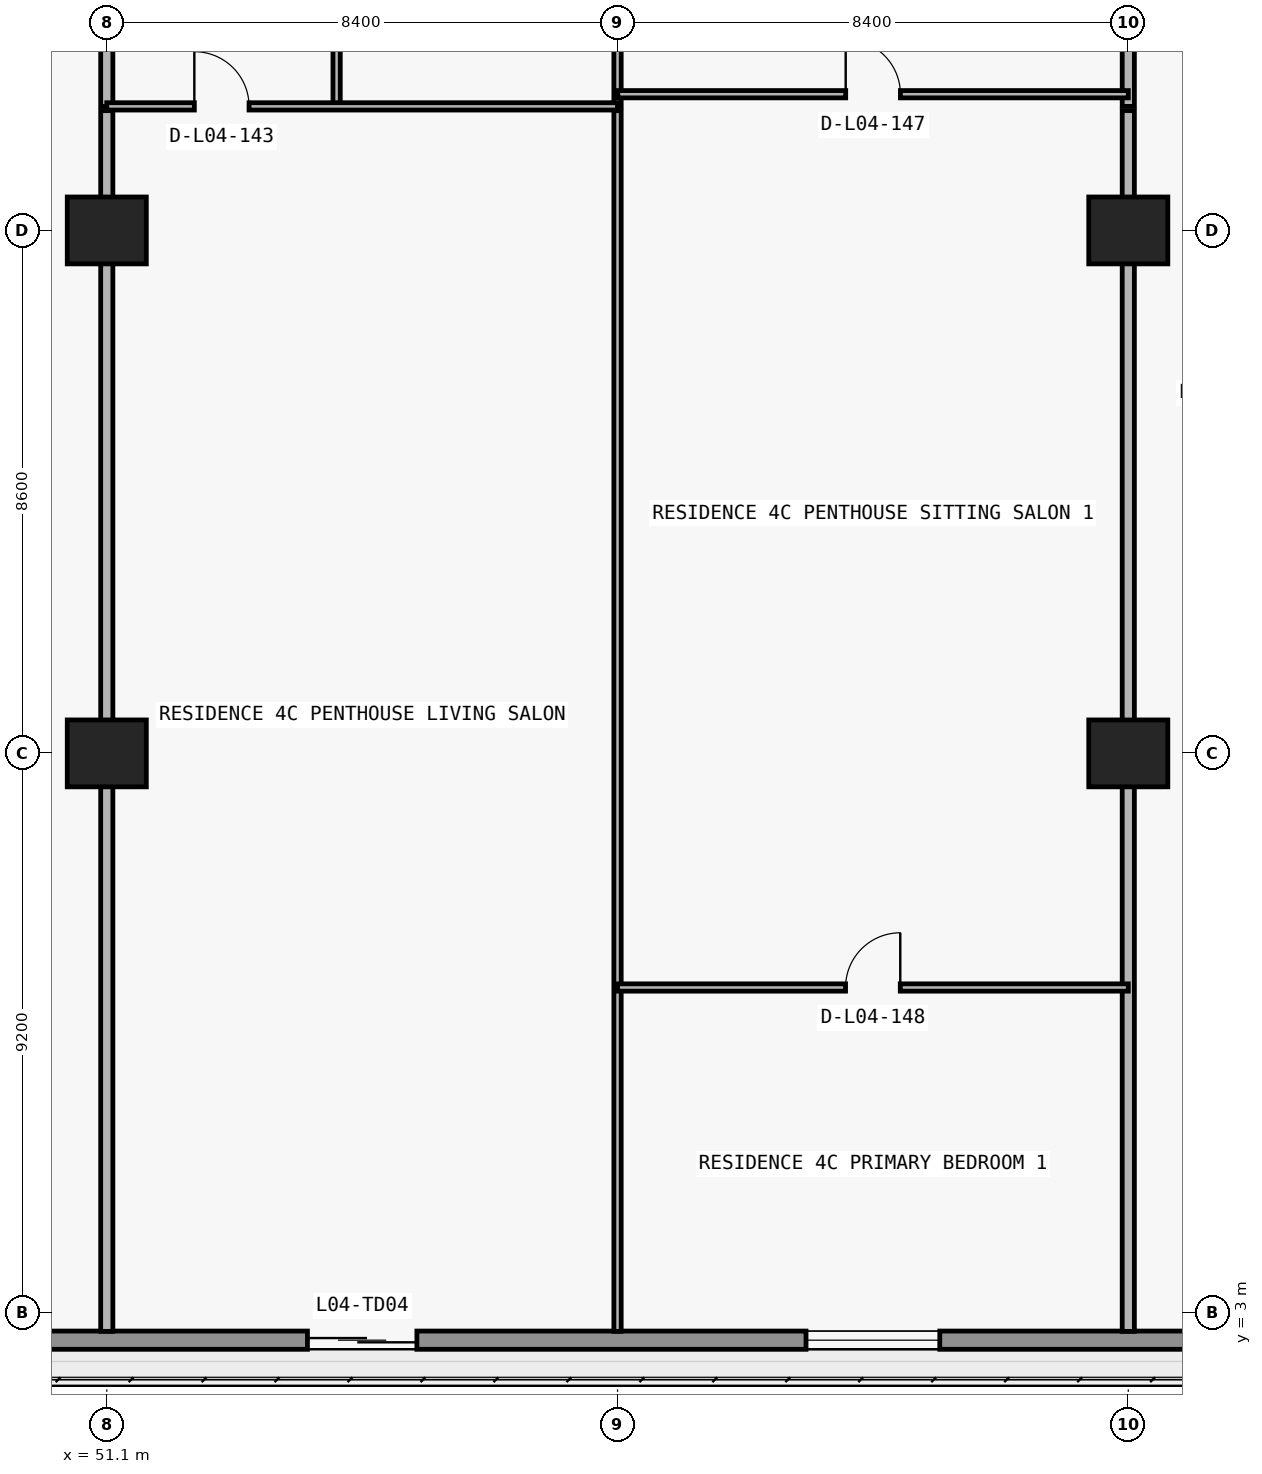
"""IFC4 building model, lengths in metres.
Left out: names, types, materials, properties, quantities, classifications, styles, units other than length and angle.
Written with IfcOpenShell. Run it as: python <this file> out.ifc"""

import sys

from ifc_helpers import new_model, si_unit, direction, frame, frame_2d, origin, origin_2d, place, context, subcontext, project, spatial, rectangle, extrude, element, fill, save


model = new_model("IFC4")
c1 = context("Model", 3, precision=1e-05, world=origin(), true_north=direction((0.0, 1.0)))
c2 = subcontext(c1, "Body", "Model", "MODEL_VIEW")
j1 = project(units=[si_unit("LENGTHUNIT", "METRE"), si_unit("PLANEANGLEUNIT", "RADIAN")], contexts=[c1])
p1 = place(None, origin())
s1 = spatial("IfcSite", under=j1, at=p1, CompositionType="ELEMENT")
p2 = place(p1, origin())
s2 = spatial("IfcBuilding", under=s1, at=p2, CompositionType="ELEMENT")
p3 = place(p2, frame((0.0, 0.0, 19.8)))
s3 = spatial("IfcBuildingStorey", under=s2, at=p3, CompositionType="ELEMENT", Elevation=19.8)
for number, where, z_axis, x_axis in (
    (1, (51.1, 12.2, 0.0), (0.0, 0.0, 1.0), (1.0, 0.0, 0.0)),
    (2, (67.9, 12.2, 0.0), (0.0, 0.0, 1.0), (1.0, 0.0, 0.0)),
    (3, (51.1, 20.8, 0.0), (0.0, 0.0, 1.0), (1.0, 0.0, 0.0)),
    (4, (67.9, 20.8, 0.0), (0.0, 0.0, 1.0), (1.0, 0.0, 0.0)),
):
    element("IfcColumn", number, at=place(p3, frame(where, z_axis=z_axis, x_axis=x_axis)), inside=s3, PredefinedType="COLUMN", context=c2, shape_type="SweptSolid", body=[
        extrude(rectangle(XDim=1.3, YDim=1.1, at=origin_2d()), origin(), (0.0, 0.0, 1.0), 4.45),
    ])
p4 = place(p3, frame((74.15, 2.55, 0.0), z_axis=(0.0, 0.0, 1.0), x_axis=(-1.0, 0.0, 0.0)))
e5 = element("IfcWall", 5, at=p4, inside=s3, PredefinedType="STANDARD", context=c2, shape_type="SweptSolid", body=[
    extrude(rectangle(XDim=70.5, YDim=0.3, at=frame_2d((35.25, 0.0))), origin(), (0.0, 0.0, 1.0), 4.45),
])
p5 = place(p4, frame((65.875, 0.0, 0.85)))
e6 = element("IfcOpeningElement", 6, at=p5, cuts=e5, PredefinedType="OPENING", context=c2, shape_type="SweptSolid", body=[
    extrude(rectangle(XDim=3.0, YDim=2.4, at=frame_2d((1.5, 1.2))), frame((0.0, 0.16, 0.0), z_axis=(0.0, -1.0, 0.0), x_axis=(1.0, 0.0, 0.0)), (0.0, 0.0, 1.0), 0.32),
])
p6 = place(p4, frame((61.376, 0.0, 0.0)))
e7 = element("IfcOpeningElement", 7, at=p6, cuts=e5, PredefinedType="OPENING", context=c2, shape_type="SweptSolid", body=[
    extrude(rectangle(XDim=1.8, YDim=2.3, at=frame_2d((0.9, 1.15))), frame((0.0, 0.16, 0.0), z_axis=(0.0, -1.0, 0.0), x_axis=(1.0, 0.0, 0.0)), (0.0, 0.0, 1.0), 0.32),
])
p7 = place(p4, frame((56.976, 0.0, 0.85)))
e8 = element("IfcOpeningElement", 8, at=p7, cuts=e5, PredefinedType="OPENING", context=c2, shape_type="SweptSolid", body=[
    extrude(rectangle(XDim=2.2, YDim=1.55, at=frame_2d((1.1, 0.775))), frame((0.0, 0.16, 0.0), z_axis=(0.0, -1.0, 0.0), x_axis=(1.0, 0.0, 0.0)), (0.0, 0.0, 1.0), 0.32),
])
p8 = place(p4, frame((52.64, 0.0, 0.0)))
e9 = element("IfcOpeningElement", 9, at=p8, cuts=e5, PredefinedType="OPENING", context=c2, shape_type="SweptSolid", body=[
    extrude(rectangle(XDim=1.8, YDim=2.3, at=frame_2d((0.9, 1.15))), frame((0.0, 0.16, 0.0), z_axis=(0.0, -1.0, 0.0), x_axis=(1.0, 0.0, 0.0)), (0.0, 0.0, 1.0), 0.32),
])
p9 = place(p4, frame((48.24, 0.0, 0.85)))
e10 = element("IfcOpeningElement", 10, at=p9, cuts=e5, PredefinedType="OPENING", context=c2, shape_type="SweptSolid", body=[
    extrude(rectangle(XDim=2.2, YDim=1.55, at=frame_2d((1.1, 0.775))), frame((0.0, 0.16, 0.0), z_axis=(0.0, -1.0, 0.0), x_axis=(1.0, 0.0, 0.0)), (0.0, 0.0, 1.0), 0.32),
])
p10 = place(p4, frame((34.35, 0.0, 0.0)))
e11 = element("IfcOpeningElement", 11, at=p10, cuts=e5, PredefinedType="OPENING", context=c2, shape_type="SweptSolid", body=[
    extrude(rectangle(XDim=1.8, YDim=2.3, at=frame_2d((0.9, 1.15))), frame((0.0, 0.16, 0.0), z_axis=(0.0, -1.0, 0.0), x_axis=(1.0, 0.0, 0.0)), (0.0, 0.0, 1.0), 0.32),
])
p11 = place(p4, frame((17.95, 0.0, 0.0)))
e12 = element("IfcOpeningElement", 12, at=p11, cuts=e5, PredefinedType="OPENING", context=c2, shape_type="SweptSolid", body=[
    extrude(rectangle(XDim=1.8, YDim=2.3, at=frame_2d((0.9, 1.15))), frame((0.0, 0.16, 0.0), z_axis=(0.0, -1.0, 0.0), x_axis=(1.0, 0.0, 0.0)), (0.0, 0.0, 1.0), 0.32),
])
p12 = place(p4, frame((9.35, 0.0, 0.85)))
e13 = element("IfcOpeningElement", 13, at=p12, cuts=e5, PredefinedType="OPENING", context=c2, shape_type="SweptSolid", body=[
    extrude(rectangle(XDim=2.2, YDim=1.55, at=frame_2d((1.1, 0.775))), frame((0.0, 0.16, 0.0), z_axis=(0.0, -1.0, 0.0), x_axis=(1.0, 0.0, 0.0)), (0.0, 0.0, 1.0), 0.32),
])
p13 = place(p4, frame((1.625, 0.0, 0.85)))
e14 = element("IfcOpeningElement", 14, at=p13, cuts=e5, PredefinedType="OPENING", context=c2, shape_type="SweptSolid", body=[
    extrude(rectangle(XDim=3.0, YDim=2.4, at=frame_2d((1.5, 1.2))), frame((0.0, 0.16, 0.0), z_axis=(0.0, -1.0, 0.0), x_axis=(1.0, 0.0, 0.0)), (0.0, 0.0, 1.0), 0.32),
])
p14 = place(p3, frame((51.1, 2.695, 0.0), z_axis=(0.0, 0.0, 1.0), x_axis=(0.0, 1.0, 0.0)))
e15 = element("IfcWall", 15, at=p14, inside=s3, PredefinedType="PARTITIONING", context=c2, shape_type="SweptSolid", body=[
    extrude(rectangle(XDim=20.075, YDim=0.2, at=frame_2d((10.038, 0.0))), origin(), (0.0, 0.0, 1.0), 3.414),
])
p15 = place(p3, frame((51.1, 22.84, 0.0), z_axis=(0.0, 0.0, 1.0), x_axis=(0.0, 1.0, 0.0)))
e16 = element("IfcWall", 16, at=p15, inside=s3, PredefinedType="PARTITIONING", context=c2, shape_type="SweptSolid", body=[
    extrude(rectangle(XDim=10.86, YDim=0.2, at=frame_2d((5.43, 0.0))), origin(), (0.0, 0.0, 1.0), 3.414),
])
p16 = place(p3, frame((54.88, 22.84, 0.0), z_axis=(0.0, 0.0, 1.0), x_axis=(0.0, 1.0, 0.0)))
e17 = element("IfcWall", 17, at=p16, inside=s3, PredefinedType="PARTITIONING", context=c2, shape_type="SweptSolid", body=[
    extrude(rectangle(XDim=4.8, YDim=0.12, at=frame_2d((2.4, 0.0))), origin(), (0.0, 0.0, 1.0), 4.45),
])
p17 = place(p16, frame((1.95, 0.0, 0.0)))
e18 = element("IfcOpeningElement", 18, at=p17, cuts=e17, PredefinedType="OPENING", context=c2, shape_type="SweptSolid", body=[
    extrude(rectangle(XDim=0.9, YDim=2.15, at=frame_2d((0.45, 1.075))), frame((0.0, 0.07, 0.0), z_axis=(0.0, -1.0, 0.0), x_axis=(1.0, 0.0, 0.0)), (0.0, 0.0, 1.0), 0.14),
])
p18 = place(p3, frame((59.5, 2.695, 0.0), z_axis=(0.0, 0.0, 1.0), x_axis=(0.0, 1.0, 0.0)))
e19 = element("IfcWall", 19, at=p18, inside=s3, PredefinedType="PARTITIONING", context=c2, shape_type="SweptSolid", body=[
    extrude(rectangle(XDim=20.075, YDim=0.12, at=frame_2d((10.038, 0.0))), origin(), (0.0, 0.0, 1.0), 4.45),
])
p19 = place(p3, frame((59.5, 22.84, 0.0), z_axis=(0.0, 0.0, 1.0), x_axis=(0.0, 1.0, 0.0)))
e20 = element("IfcWall", 20, at=p19, inside=s3, PredefinedType="PARTITIONING", context=c2, shape_type="SweptSolid", body=[
    extrude(rectangle(XDim=10.86, YDim=0.12, at=frame_2d((5.43, 0.0))), origin(), (0.0, 0.0, 1.0), 4.45),
])
p20 = place(p19, frame((1.95, 0.0, 0.0)))
e21 = element("IfcOpeningElement", 21, at=p20, cuts=e20, PredefinedType="OPENING", context=c2, shape_type="SweptSolid", body=[
    extrude(rectangle(XDim=0.9, YDim=2.15, at=frame_2d((0.45, 1.075))), frame((0.0, 0.07, 0.0), z_axis=(0.0, -1.0, 0.0), x_axis=(1.0, 0.0, 0.0)), (0.0, 0.0, 1.0), 0.14),
])
p21 = place(p3, frame((67.9, 2.695, 0.0), z_axis=(0.0, 0.0, 1.0), x_axis=(0.0, 1.0, 0.0)))
e22 = element("IfcWall", 22, at=p21, inside=s3, PredefinedType="PARTITIONING", context=c2, shape_type="SweptSolid", body=[
    extrude(rectangle(XDim=20.075, YDim=0.2, at=frame_2d((10.038, 0.0))), origin(), (0.0, 0.0, 1.0), 3.414),
])
p22 = place(p3, frame((67.9, 22.84, 0.0), z_axis=(0.0, 0.0, 1.0), x_axis=(0.0, 1.0, 0.0)))
e23 = element("IfcWall", 23, at=p22, inside=s3, PredefinedType="PARTITIONING", context=c2, shape_type="SweptSolid", body=[
    extrude(rectangle(XDim=10.86, YDim=0.2, at=frame_2d((5.43, 0.0))), origin(), (0.0, 0.0, 1.0), 3.414),
])
p23 = place(p3, frame((59.5, 8.35, 0.0), z_axis=(0.0, 0.0, 1.0), x_axis=(1.0, 0.0, 0.0)))
e24 = element("IfcWall", 24, at=p23, inside=s3, PredefinedType="PARTITIONING", context=c2, shape_type="SweptSolid", body=[
    extrude(rectangle(XDim=8.4, YDim=0.12, at=frame_2d((4.2, 0.0))), origin(), (0.0, 0.0, 1.0), 4.45),
])
p24 = place(p23, frame((3.75, 0.0, 0.0)))
e25 = element("IfcOpeningElement", 25, at=p24, cuts=e24, PredefinedType="OPENING", context=c2, shape_type="SweptSolid", body=[
    extrude(rectangle(XDim=0.9, YDim=2.15, at=frame_2d((0.45, 1.075))), frame((0.0, 0.07, 0.0), z_axis=(0.0, -1.0, 0.0), x_axis=(1.0, 0.0, 0.0)), (0.0, 0.0, 1.0), 0.14),
])
p25 = place(p3, frame((51.1, 22.84, 0.0), z_axis=(0.0, 0.0, 1.0), x_axis=(1.0, 0.0, 0.0)))
e26 = element("IfcWall", 26, at=p25, inside=s3, PredefinedType="PARTITIONING", context=c2, shape_type="SweptSolid", body=[
    extrude(rectangle(XDim=8.4, YDim=0.12, at=frame_2d((4.2, 0.0))), origin(), (0.0, 0.0, 1.0), 4.45),
])
p26 = place(p25, frame((1.44, 0.0, 0.0)))
e27 = element("IfcOpeningElement", 27, at=p26, cuts=e26, PredefinedType="OPENING", context=c2, shape_type="SweptSolid", body=[
    extrude(rectangle(XDim=0.9, YDim=2.15, at=frame_2d((0.45, 1.075))), frame((0.0, 0.07, 0.0), z_axis=(0.0, -1.0, 0.0), x_axis=(1.0, 0.0, 0.0)), (0.0, 0.0, 1.0), 0.14),
])
p27 = place(p3, frame((59.505, 23.04, 0.0), z_axis=(0.0, 0.0, 1.0), x_axis=(1.0, 0.0, 0.0)))
e28 = element("IfcWall", 28, at=p27, inside=s3, PredefinedType="PARTITIONING", context=c2, shape_type="SweptSolid", body=[
    extrude(rectangle(XDim=8.395, YDim=0.12, at=frame_2d((4.198, 0.0))), origin(), (0.0, 0.0, 1.0), 4.45),
])
p28 = place(p27, frame((3.748, 0.0, 0.0)))
e29 = element("IfcOpeningElement", 29, at=p28, cuts=e28, PredefinedType="OPENING", context=c2, shape_type="SweptSolid", body=[
    extrude(rectangle(XDim=0.9, YDim=2.15, at=frame_2d((0.45, 1.075))), frame((0.0, 0.07, 0.0), z_axis=(0.0, -1.0, 0.0), x_axis=(1.0, 0.0, 0.0)), (0.0, 0.0, 1.0), 0.14),
])
p29 = place(p11, origin())
e30 = element("IfcDoor", 30, at=p29, inside=s3, OperationType="DOUBLE_DOOR_SLIDING", PredefinedType="DOOR", context=c2, shape_type="SweptSolid", body=[
    extrude(rectangle(XDim=1.8, YDim=2.3, at=frame_2d((0.9, 1.15))), frame((0.0, 0.025, 0.0), z_axis=(0.0, -1.0, 0.0), x_axis=(1.0, 0.0, 0.0)), (0.0, 0.0, 1.0), 0.05),
])
fill(e12, e30)
p30 = place(p12, origin())
e31 = element("IfcWindow", 31, at=p30, inside=s3, PartitioningType="SINGLE_PANEL", PredefinedType="WINDOW", context=c2, shape_type="SweptSolid", body=[
    extrude(rectangle(XDim=2.2, YDim=1.55, at=frame_2d((1.1, 0.775))), frame((0.0, 0.03, 0.0), z_axis=(0.0, -1.0, 0.0), x_axis=(1.0, 0.0, 0.0)), (0.0, 0.0, 1.0), 0.06),
])
fill(e13, e31)
p31 = place(p26, origin())
e32 = element("IfcDoor", 32, at=p31, inside=s3, OperationType="SINGLE_SWING_LEFT", PredefinedType="DOOR", context=c2, shape_type="SweptSolid", body=[
    extrude(rectangle(XDim=0.9, YDim=2.15, at=frame_2d((0.45, 1.075))), frame((0.0, 0.025, 0.0), z_axis=(0.0, -1.0, 0.0), x_axis=(1.0, 0.0, 0.0)), (0.0, 0.0, 1.0), 0.05),
])
fill(e27, e32)
p32 = place(p28, origin())
e33 = element("IfcDoor", 33, at=p32, inside=s3, OperationType="SINGLE_SWING_LEFT", PredefinedType="DOOR", context=c2, shape_type="SweptSolid", body=[
    extrude(rectangle(XDim=0.9, YDim=2.15, at=frame_2d((0.45, 1.075))), frame((0.0, 0.025, 0.0), z_axis=(0.0, -1.0, 0.0), x_axis=(1.0, 0.0, 0.0)), (0.0, 0.0, 1.0), 0.05),
])
fill(e29, e33)
p33 = place(p24, origin())
e34 = element("IfcDoor", 34, at=p33, inside=s3, OperationType="SINGLE_SWING_RIGHT", PredefinedType="DOOR", context=c2, shape_type="SweptSolid", body=[
    extrude(rectangle(XDim=0.9, YDim=2.15, at=frame_2d((0.45, 1.075))), frame((0.0, 0.025, 0.0), z_axis=(0.0, -1.0, 0.0), x_axis=(1.0, 0.0, 0.0)), (0.0, 0.0, 1.0), 0.05),
])
fill(e25, e34)
save(model, sys.argv[1])
